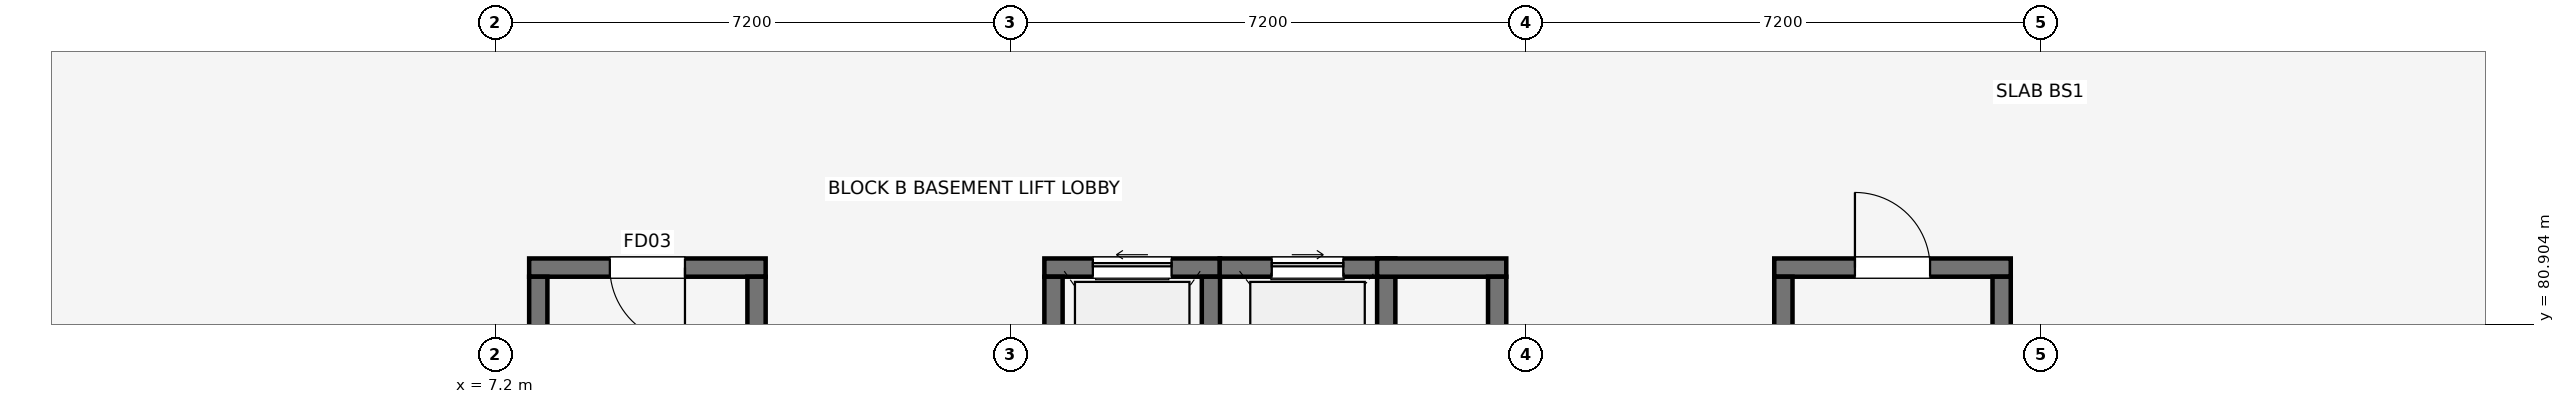
"""IFC4 building model, lengths in metres.
Left out: names, types, materials, properties, quantities, classifications, styles, units other than length and angle.
Written with IfcOpenShell. Run it as: python <this file> out.ifc"""

import sys

from ifc_helpers import new_model, si_unit, direction, frame, frame_2d, origin, place, context, subcontext, project, spatial, rectangle, extrude, element, fill, save


model = new_model("IFC4")
c1 = context("Model", 3, precision=1e-05, world=origin(), true_north=direction((0.0, 1.0)))
c2 = subcontext(c1, "Body", "Model", "MODEL_VIEW")
j1 = project(units=[si_unit("LENGTHUNIT", "METRE"), si_unit("PLANEANGLEUNIT", "RADIAN")], contexts=[c1])
p1 = place(None, origin())
s1 = spatial("IfcSite", under=j1, at=p1, CompositionType="ELEMENT")
p2 = place(p1, origin())
s2 = spatial("IfcBuilding", under=s1, at=p2, CompositionType="ELEMENT")
p3 = place(p2, frame((0.0, 0.0, -3.6)))
s3 = spatial("IfcBuildingStorey", under=s2, at=p3, CompositionType="ELEMENT", Elevation=-3.6)
p4 = place(p3, frame((7.673, 81.7, 0.0), z_axis=(0.0, 0.0, 1.0), x_axis=(1.0, 0.0, 0.0)))
e1 = element("IfcWall", 1, at=p4, inside=s3, PredefinedType="SHEAR", context=c2, shape_type="SweptSolid", body=[
    extrude(rectangle(XDim=3.305, YDim=0.255, at=frame_2d((1.652, 0.0))), origin(), (0.0, 0.0, 1.0), 3.6),
])
p5 = place(p4, frame((2.177, 0.0, 0.0), z_axis=(0.0, 0.0, 1.0), x_axis=(-1.0, 0.0, 0.0)))
e2 = element("IfcOpeningElement", 2, at=p5, cuts=e1, PredefinedType="OPENING", context=c2, shape_type="SweptSolid", body=[
    extrude(rectangle(XDim=1.05, YDim=2.12, at=frame_2d((0.525, 1.06))), frame((0.0, 0.137, 0.0), z_axis=(0.0, -1.0, 0.0), x_axis=(1.0, 0.0, 0.0)), (0.0, 0.0, 1.0), 0.275),
])
for number, where, z_axis, x_axis in (
    (3, (7.8, 75.278, 0.0), (0.0, 0.0, 1.0), (0.0, 1.0, 0.0)),
    (4, (10.85, 75.278, 0.0), (0.0, 0.0, 1.0), (0.0, 1.0, 0.0)),
):
    element("IfcWall", number, at=place(p3, frame(where, z_axis=z_axis, x_axis=x_axis)), inside=s3, PredefinedType="SHEAR", context=c2, shape_type="SweptSolid", body=[
        extrude(rectangle(XDim=6.295, YDim=0.255, at=frame_2d((3.147, 0.0))), origin(), (0.0, 0.0, 1.0), 3.6),
    ])
p6 = place(p3, frame((25.073, 81.7, 0.0), z_axis=(0.0, 0.0, 1.0), x_axis=(1.0, 0.0, 0.0)))
e5 = element("IfcWall", 5, at=p6, inside=s3, PredefinedType="SHEAR", context=c2, shape_type="SweptSolid", body=[
    extrude(rectangle(XDim=3.305, YDim=0.255, at=frame_2d((1.652, 0.0))), origin(), (0.0, 0.0, 1.0), 3.6),
])
p7 = place(p6, frame((1.127, 0.0, 0.0)))
e6 = element("IfcOpeningElement", 6, at=p7, cuts=e5, PredefinedType="OPENING", context=c2, shape_type="SweptSolid", body=[
    extrude(rectangle(XDim=1.05, YDim=2.12, at=frame_2d((0.525, 1.06))), frame((0.0, 0.137, 0.0), z_axis=(0.0, -1.0, 0.0), x_axis=(1.0, 0.0, 0.0)), (0.0, 0.0, 1.0), 0.275),
])
for number, where, z_axis, x_axis in (
    (7, (25.2, 75.278, 0.0), (0.0, 0.0, 1.0), (0.0, 1.0, 0.0)),
    (8, (28.25, 75.278, 0.0), (0.0, 0.0, 1.0), (0.0, 1.0, 0.0)),
):
    element("IfcWall", number, at=place(p3, frame(where, z_axis=z_axis, x_axis=x_axis)), inside=s3, PredefinedType="SHEAR", context=c2, shape_type="SweptSolid", body=[
        extrude(rectangle(XDim=6.295, YDim=0.255, at=frame_2d((3.147, 0.0))), origin(), (0.0, 0.0, 1.0), 3.6),
    ])
p8 = place(p3, frame((14.873, 81.7, 0.0), z_axis=(0.0, 0.0, 1.0), x_axis=(1.0, 0.0, 0.0)))
e9 = element("IfcWall", 9, at=p8, inside=s3, PredefinedType="SHEAR", context=c2, shape_type="SweptSolid", body=[
    extrude(rectangle(XDim=2.455, YDim=0.255, at=frame_2d((1.228, 0.0))), origin(), (0.0, 0.0, 1.0), 3.6),
])
p9 = place(p8, frame((0.677, 0.0, 0.0)))
e10 = element("IfcOpeningElement", 10, at=p9, cuts=e9, PredefinedType="OPENING", context=c2, shape_type="SweptSolid", body=[
    extrude(rectangle(XDim=1.1, YDim=2.15, at=frame_2d((0.55, 1.075))), frame((0.0, 0.137, 0.0), z_axis=(0.0, -1.0, 0.0), x_axis=(1.0, 0.0, 0.0)), (0.0, 0.0, 1.0), 0.275),
])
for number, where, z_axis, x_axis in (
    (11, (15.0, 79.028, 0.0), (0.0, 0.0, 1.0), (0.0, 1.0, 0.0)),
    (12, (17.2, 79.028, 0.0), (0.0, 0.0, 1.0), (0.0, 1.0, 0.0)),
):
    element("IfcWall", number, at=place(p3, frame(where, z_axis=z_axis, x_axis=x_axis)), inside=s3, PredefinedType="SHEAR", context=c2, shape_type="SweptSolid", body=[
        extrude(rectangle(XDim=2.545, YDim=0.255, at=frame_2d((1.272, 0.0))), origin(), (0.0, 0.0, 1.0), 3.6),
    ])
p10 = place(p3, frame((17.323, 81.7, 0.0), z_axis=(0.0, 0.0, 1.0), x_axis=(1.0, 0.0, 0.0)))
e13 = element("IfcWall", 13, at=p10, inside=s3, PredefinedType="SHEAR", context=c2, shape_type="SweptSolid", body=[
    extrude(rectangle(XDim=2.455, YDim=0.255, at=frame_2d((1.228, 0.0))), origin(), (0.0, 0.0, 1.0), 3.6),
])
p11 = place(p10, frame((0.728, 0.0, 0.0)))
e14 = element("IfcOpeningElement", 14, at=p11, cuts=e13, PredefinedType="OPENING", context=c2, shape_type="SweptSolid", body=[
    extrude(rectangle(XDim=1.0, YDim=2.15, at=frame_2d((0.5, 1.075))), frame((0.0, 0.137, 0.0), z_axis=(0.0, -1.0, 0.0), x_axis=(1.0, 0.0, 0.0)), (0.0, 0.0, 1.0), 0.275),
])
p12 = place(p3, frame((19.65, 79.327, 0.0), z_axis=(0.0, 0.0, 1.0), x_axis=(0.0, 1.0, 0.0)))
e15 = element("IfcWall", 15, at=p12, inside=s3, PredefinedType="SHEAR", context=c2, shape_type="SweptSolid", body=[
    extrude(rectangle(XDim=2.245, YDim=0.255, at=frame_2d((1.123, 0.0))), origin(), (0.0, 0.0, 1.0), 3.6),
])
p13 = place(p3, frame((19.522, 81.7, 0.0), z_axis=(0.0, 0.0, 1.0), x_axis=(1.0, 0.0, 0.0)))
e16 = element("IfcWall", 16, at=p13, inside=s3, PredefinedType="SHEAR", context=c2, shape_type="SweptSolid", body=[
    extrude(rectangle(XDim=1.805, YDim=0.255, at=frame_2d((0.902, 0.0))), origin(), (0.0, 0.0, 1.0), 3.6),
])
p14 = place(p3, frame((21.2, 79.627, 0.0), z_axis=(0.0, 0.0, 1.0), x_axis=(0.0, 1.0, 0.0)))
e17 = element("IfcWall", 17, at=p14, inside=s3, PredefinedType="SHEAR", context=c2, shape_type="SweptSolid", body=[
    extrude(rectangle(XDim=1.945, YDim=0.255, at=frame_2d((0.973, 0.0))), origin(), (0.0, 0.0, 1.0), 3.6),
])
p15 = place(p5, origin())
e18 = element("IfcDoor", 18, at=p15, inside=s3, OperationType="SINGLE_SWING_RIGHT", PredefinedType="DOOR", context=c2, shape_type="SweptSolid", body=[
    extrude(rectangle(XDim=1.05, YDim=2.12, at=frame_2d((0.525, 1.06))), frame((0.0, 0.025, 0.0), z_axis=(0.0, -1.0, 0.0), x_axis=(1.0, 0.0, 0.0)), (0.0, 0.0, 1.0), 0.05),
])
fill(e2, e18)
p16 = place(p7, origin())
e19 = element("IfcDoor", 19, at=p16, inside=s3, OperationType="SINGLE_SWING_LEFT", PredefinedType="DOOR", context=c2, shape_type="SweptSolid", body=[
    extrude(rectangle(XDim=1.05, YDim=2.12, at=frame_2d((0.525, 1.06))), frame((0.0, 0.025, 0.0), z_axis=(0.0, -1.0, 0.0), x_axis=(1.0, 0.0, 0.0)), (0.0, 0.0, 1.0), 0.05),
])
fill(e6, e19)
p17 = place(p9, origin())
e20 = element("IfcDoor", 20, at=p17, inside=s3, OperationType="SLIDING_TO_LEFT", PredefinedType="DOOR", context=c2, shape_type="SweptSolid", body=[
    extrude(rectangle(XDim=1.1, YDim=2.15, at=frame_2d((0.55, 1.075))), frame((0.0, 0.025, 0.0), z_axis=(0.0, -1.0, 0.0), x_axis=(1.0, 0.0, 0.0)), (0.0, 0.0, 1.0), 0.05),
])
fill(e10, e20)
p18 = place(p11, origin())
e21 = element("IfcDoor", 21, at=p18, inside=s3, OperationType="SLIDING_TO_RIGHT", PredefinedType="DOOR", context=c2, shape_type="SweptSolid", body=[
    extrude(rectangle(XDim=1.0, YDim=2.15, at=frame_2d((0.5, 1.075))), frame((0.0, 0.025, 0.0), z_axis=(0.0, -1.0, 0.0), x_axis=(1.0, 0.0, 0.0)), (0.0, 0.0, 1.0), 0.05),
])
fill(e14, e21)
save(model, sys.argv[1])
